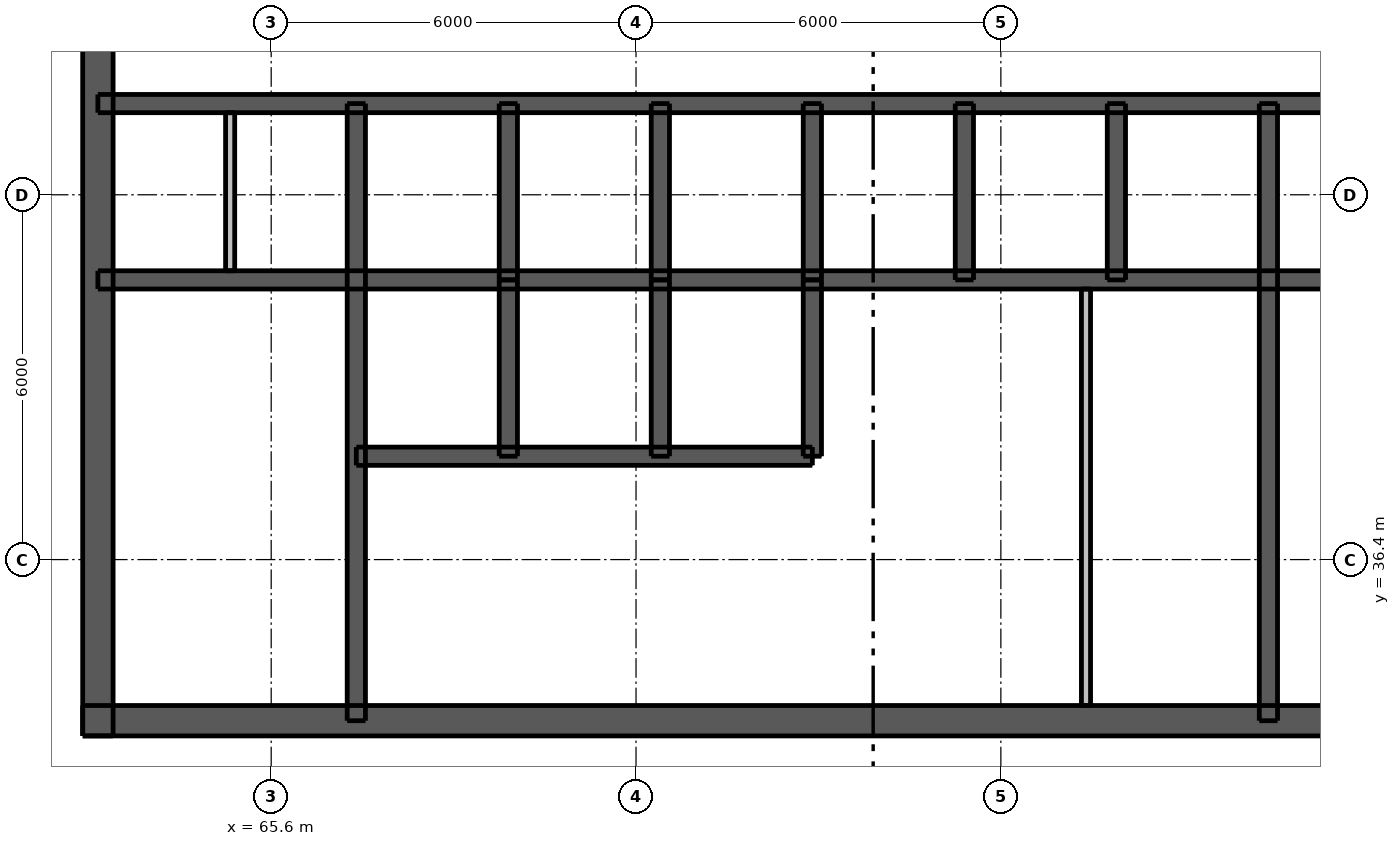
"""IFC4 building model, lengths in metres.
Left out: names, types, materials, properties, quantities, classifications, styles, units other than length and angle.
Written with IfcOpenShell. Run it as: python <this file> out.ifc"""

import sys

from ifc_helpers import new_model, si_unit, direction, frame, frame_2d, origin, place, context, subcontext, project, spatial, rectangle, extrude, element, fill, save


model = new_model("IFC4")
c1 = context("Model", 3, precision=1e-05, world=origin(), true_north=direction((0.0, 1.0)))
c2 = subcontext(c1, "Body", "Model", "MODEL_VIEW")
j1 = project(units=[si_unit("LENGTHUNIT", "METRE"), si_unit("PLANEANGLEUNIT", "RADIAN")], contexts=[c1])
p1 = place(None, origin())
s1 = spatial("IfcSite", under=j1, at=p1, CompositionType="ELEMENT")
p2 = place(p1, origin())
s2 = spatial("IfcBuilding", under=s1, at=p2, CompositionType="ELEMENT")
p3 = place(p2, frame((0.0, 0.0, 248.8)))
s3 = spatial("IfcBuildingStorey", under=s2, at=p3, CompositionType="ELEMENT", Elevation=248.8)
p4 = place(p3, frame((62.5, 33.75, 0.0), z_axis=(0.0, 0.0, 1.0), x_axis=(1.0, 0.0, 0.0)))
e1 = element("IfcWall", 1, at=p4, inside=s3, PredefinedType="SHEAR", context=c2, shape_type="SweptSolid", body=[
    extrude(rectangle(XDim=24.0, YDim=0.5, at=frame_2d((12.0, 0.0))), origin(), (0.0, 0.0, 1.0), 3.05),
])
p5 = place(p4, frame((1.875, 0.0, 0.0)))
e2 = element("IfcOpeningElement", 2, at=p5, cuts=e1, PredefinedType="OPENING", context=c2, shape_type="SweptSolid", body=[
    extrude(rectangle(XDim=1.1, YDim=2.1, at=frame_2d((0.55, 1.05))), frame((0.0, 0.26, 0.0), z_axis=(0.0, -1.0, 0.0), x_axis=(1.0, 0.0, 0.0)), (0.0, 0.0, 1.0), 0.52),
])
p6 = place(p4, frame((21.025, 0.0, 0.0)))
e3 = element("IfcOpeningElement", 3, at=p6, cuts=e1, PredefinedType="OPENING", context=c2, shape_type="SweptSolid", body=[
    extrude(rectangle(XDim=1.1, YDim=2.1, at=frame_2d((0.55, 1.05))), frame((0.0, 0.26, 0.0), z_axis=(0.0, -1.0, 0.0), x_axis=(1.0, 0.0, 0.0)), (0.0, 0.0, 1.0), 0.52),
])
p7 = place(p4, frame((8.0, 0.0, 0.0)))
e4 = element("IfcOpeningElement", 4, at=p7, cuts=e1, PredefinedType="OPENING", context=c2, shape_type="SweptSolid", body=[
    extrude(rectangle(XDim=1.1, YDim=2.1, at=frame_2d((0.55, 1.05))), frame((0.0, 0.26, 0.0), z_axis=(0.0, -1.0, 0.0), x_axis=(1.0, 0.0, 0.0)), (0.0, 0.0, 1.0), 0.52),
])
p8 = place(p4, frame((17.512, 0.0, 0.0)))
e5 = element("IfcOpeningElement", 5, at=p8, cuts=e1, PredefinedType="OPENING", context=c2, shape_type="SweptSolid", body=[
    extrude(rectangle(XDim=0.9, YDim=2.1, at=frame_2d((0.45, 1.05))), frame((0.0, 0.26, 0.0), z_axis=(0.0, -1.0, 0.0), x_axis=(1.0, 0.0, 0.0)), (0.0, 0.0, 1.0), 0.52),
])
p9 = place(p3, frame((62.75, 33.5, 0.0), z_axis=(0.0, 0.0, 1.0), x_axis=(0.0, 1.0, 0.0)))
e6 = element("IfcWall", 6, at=p9, inside=s3, PredefinedType="SHEAR", context=c2, shape_type="SweptSolid", body=[
    extrude(rectangle(XDim=24.0, YDim=0.5, at=frame_2d((12.0, 0.0))), origin(), (0.0, 0.0, 1.0), 3.05),
])
p10 = place(p9, frame((11.2, 0.0, 0.0)))
e7 = element("IfcOpeningElement", 7, at=p10, cuts=e6, PredefinedType="OPENING", context=c2, shape_type="SweptSolid", body=[
    extrude(rectangle(XDim=1.6, YDim=2.1, at=frame_2d((0.8, 1.05))), frame((0.0, 0.26, 0.0), z_axis=(0.0, -1.0, 0.0), x_axis=(1.0, 0.0, 0.0)), (0.0, 0.0, 1.0), 0.52),
])
p11 = place(p3, frame((62.75, 41.0, 0.0), z_axis=(0.0, 0.0, 1.0), x_axis=(1.0, 0.0, 0.0)))
e8 = element("IfcWall", 8, at=p11, inside=s3, PredefinedType="SHEAR", context=c2, shape_type="SweptSolid", body=[
    extrude(rectangle(XDim=23.5, YDim=0.3, at=frame_2d((11.75, 0.0))), origin(), (0.0, 0.0, 1.0), 3.05),
])
p12 = place(p3, frame((62.75, 43.9, 0.0), z_axis=(0.0, 0.0, 1.0), x_axis=(1.0, 0.0, 0.0)))
e9 = element("IfcWall", 9, at=p12, inside=s3, PredefinedType="SHEAR", context=c2, shape_type="SweptSolid", body=[
    extrude(rectangle(XDim=23.5, YDim=0.3, at=frame_2d((11.75, 0.0))), origin(), (0.0, 0.0, 1.0), 3.05),
])
p13 = place(p12, frame((0.762, 0.0, 0.0)))
e10 = element("IfcOpeningElement", 10, at=p13, cuts=e9, PredefinedType="OPENING", context=c2, shape_type="SweptSolid", body=[
    extrude(rectangle(XDim=0.9, YDim=2.1, at=frame_2d((0.45, 1.05))), frame((0.0, 0.16, 0.0), z_axis=(0.0, -1.0, 0.0), x_axis=(1.0, 0.0, 0.0)), (0.0, 0.0, 1.0), 0.32),
])
p14 = place(p12, frame((2.688, 0.0, 0.0)))
e11 = element("IfcOpeningElement", 11, at=p14, cuts=e9, PredefinedType="OPENING", context=c2, shape_type="SweptSolid", body=[
    extrude(rectangle(XDim=0.9, YDim=2.1, at=frame_2d((0.45, 1.05))), frame((0.0, 0.16, 0.0), z_axis=(0.0, -1.0, 0.0), x_axis=(1.0, 0.0, 0.0)), (0.0, 0.0, 1.0), 0.32),
])
p15 = place(p12, frame((20.875, 0.0, 0.0)))
e12 = element("IfcOpeningElement", 12, at=p15, cuts=e9, PredefinedType="OPENING", context=c2, shape_type="SweptSolid", body=[
    extrude(rectangle(XDim=0.9, YDim=2.1, at=frame_2d((0.45, 1.05))), frame((0.0, 0.16, 0.0), z_axis=(0.0, -1.0, 0.0), x_axis=(1.0, 0.0, 0.0)), (0.0, 0.0, 1.0), 0.32),
])
p16 = place(p12, frame((5.05, 0.0, 0.0)))
e13 = element("IfcOpeningElement", 13, at=p16, cuts=e9, PredefinedType="OPENING", context=c2, shape_type="SweptSolid", body=[
    extrude(rectangle(XDim=0.9, YDim=2.1, at=frame_2d((0.45, 1.05))), frame((0.0, 0.16, 0.0), z_axis=(0.0, -1.0, 0.0), x_axis=(1.0, 0.0, 0.0)), (0.0, 0.0, 1.0), 0.32),
])
p17 = place(p12, frame((7.55, 0.0, 0.0)))
e14 = element("IfcOpeningElement", 14, at=p17, cuts=e9, PredefinedType="OPENING", context=c2, shape_type="SweptSolid", body=[
    extrude(rectangle(XDim=0.9, YDim=2.1, at=frame_2d((0.45, 1.05))), frame((0.0, 0.16, 0.0), z_axis=(0.0, -1.0, 0.0), x_axis=(1.0, 0.0, 0.0)), (0.0, 0.0, 1.0), 0.32),
])
p18 = place(p12, frame((12.55, 0.0, 0.0)))
e15 = element("IfcOpeningElement", 15, at=p18, cuts=e9, PredefinedType="OPENING", context=c2, shape_type="SweptSolid", body=[
    extrude(rectangle(XDim=0.9, YDim=2.1, at=frame_2d((0.45, 1.05))), frame((0.0, 0.16, 0.0), z_axis=(0.0, -1.0, 0.0), x_axis=(1.0, 0.0, 0.0)), (0.0, 0.0, 1.0), 0.32),
])
p19 = place(p12, frame((15.05, 0.0, 0.0)))
e16 = element("IfcOpeningElement", 16, at=p19, cuts=e9, PredefinedType="OPENING", context=c2, shape_type="SweptSolid", body=[
    extrude(rectangle(XDim=0.9, YDim=2.1, at=frame_2d((0.45, 1.05))), frame((0.0, 0.16, 0.0), z_axis=(0.0, -1.0, 0.0), x_axis=(1.0, 0.0, 0.0)), (0.0, 0.0, 1.0), 0.32),
])
p20 = place(p3, frame((67.0, 33.75, 0.0), z_axis=(0.0, 0.0, 1.0), x_axis=(0.0, 1.0, 0.0)))
e17 = element("IfcWall", 17, at=p20, inside=s3, PredefinedType="SHEAR", context=c2, shape_type="SweptSolid", body=[
    extrude(rectangle(XDim=10.15, YDim=0.3, at=frame_2d((5.075, 0.0))), origin(), (0.0, 0.0, 1.0), 3.05),
])
p21 = place(p20, frame((0.45, 0.0, 0.0)))
e18 = element("IfcOpeningElement", 18, at=p21, cuts=e17, PredefinedType="OPENING", context=c2, shape_type="SweptSolid", body=[
    extrude(rectangle(XDim=1.1, YDim=2.1, at=frame_2d((0.55, 1.05))), frame((0.0, 0.16, 0.0), z_axis=(0.0, -1.0, 0.0), x_axis=(1.0, 0.0, 0.0)), (0.0, 0.0, 1.0), 0.32),
])
p22 = place(p3, frame((82.0, 33.75, 0.0), z_axis=(0.0, 0.0, 1.0), x_axis=(0.0, 1.0, 0.0)))
e19 = element("IfcWall", 19, at=p22, inside=s3, PredefinedType="SHEAR", context=c2, shape_type="SweptSolid", body=[
    extrude(rectangle(XDim=10.15, YDim=0.3, at=frame_2d((5.075, 0.0))), origin(), (0.0, 0.0, 1.0), 3.05),
])
for number, where, z_axis, x_axis in (
    (20, (69.5, 41.0, 0.0), (0.0, 0.0, 1.0), (0.0, 1.0, 0.0)),
    (21, (72.0, 41.0, 0.0), (0.0, 0.0, 1.0), (0.0, 1.0, 0.0)),
    (22, (74.5, 41.0, 0.0), (0.0, 0.0, 1.0), (0.0, 1.0, 0.0)),
    (23, (77.0, 41.0, 0.0), (0.0, 0.0, 1.0), (0.0, 1.0, 0.0)),
    (24, (79.5, 41.0, 0.0), (0.0, 0.0, 1.0), (0.0, 1.0, 0.0)),
):
    element("IfcWall", number, at=place(p3, frame(where, z_axis=z_axis, x_axis=x_axis)), inside=s3, PredefinedType="SHEAR", context=c2, shape_type="SweptSolid", body=[
        extrude(rectangle(XDim=2.9, YDim=0.3, at=frame_2d((1.45, 0.0))), origin(), (0.0, 0.0, 1.0), 3.05),
    ])
p23 = place(p3, frame((67.0, 38.1, 0.0), z_axis=(0.0, 0.0, 1.0), x_axis=(1.0, 0.0, 0.0)))
e25 = element("IfcWall", 25, at=p23, inside=s3, PredefinedType="SHEAR", context=c2, shape_type="SweptSolid", body=[
    extrude(rectangle(XDim=7.5, YDim=0.3, at=frame_2d((3.75, 0.0))), origin(), (0.0, 0.0, 1.0), 3.05),
])
p24 = place(p23, frame((0.7, 0.0, 0.0)))
e26 = element("IfcOpeningElement", 26, at=p24, cuts=e25, PredefinedType="OPENING", context=c2, shape_type="SweptSolid", body=[
    extrude(rectangle(XDim=1.1, YDim=2.1, at=frame_2d((0.55, 1.05))), frame((0.0, 0.16, 0.0), z_axis=(0.0, -1.0, 0.0), x_axis=(1.0, 0.0, 0.0)), (0.0, 0.0, 1.0), 0.32),
])
p25 = place(p23, frame((3.2, 0.0, 0.0)))
e27 = element("IfcOpeningElement", 27, at=p25, cuts=e25, PredefinedType="OPENING", context=c2, shape_type="SweptSolid", body=[
    extrude(rectangle(XDim=1.1, YDim=2.1, at=frame_2d((0.55, 1.05))), frame((0.0, 0.16, 0.0), z_axis=(0.0, -1.0, 0.0), x_axis=(1.0, 0.0, 0.0)), (0.0, 0.0, 1.0), 0.32),
])
p26 = place(p23, frame((5.65, 0.0, 0.0)))
e28 = element("IfcOpeningElement", 28, at=p26, cuts=e25, PredefinedType="OPENING", context=c2, shape_type="SweptSolid", body=[
    extrude(rectangle(XDim=1.2, YDim=2.1, at=frame_2d((0.6, 1.05))), frame((0.0, 0.16, 0.0), z_axis=(0.0, -1.0, 0.0), x_axis=(1.0, 0.0, 0.0)), (0.0, 0.0, 1.0), 0.32),
])
for number, where, z_axis, x_axis in (
    (29, (69.5, 38.1, 0.0), (0.0, 0.0, 1.0), (0.0, 1.0, 0.0)),
    (30, (72.0, 38.1, 0.0), (0.0, 0.0, 1.0), (0.0, 1.0, 0.0)),
    (31, (74.5, 38.1, 0.0), (0.0, 0.0, 1.0), (0.0, 1.0, 0.0)),
):
    element("IfcWall", number, at=place(p3, frame(where, z_axis=z_axis, x_axis=x_axis)), inside=s3, PredefinedType="SHEAR", context=c2, shape_type="SweptSolid", body=[
        extrude(rectangle(XDim=2.9, YDim=0.3, at=frame_2d((1.45, 0.0))), origin(), (0.0, 0.0, 1.0), 3.05),
    ])
p27 = place(p3, frame((79.0, 34.0, 0.0), z_axis=(0.0, 0.0, 1.0), x_axis=(0.0, 1.0, 0.0)))
e32 = element("IfcWall", 32, at=p27, inside=s3, PredefinedType="PLUMBINGWALL", context=c2, shape_type="SweptSolid", body=[
    extrude(rectangle(XDim=6.85, YDim=0.15, at=frame_2d((3.425, 0.0))), origin(), (0.0, 0.0, 1.0), 3.05),
])
p28 = place(p3, frame((64.925, 41.15, 0.0), z_axis=(0.0, 0.0, 1.0), x_axis=(0.0, 1.0, 0.0)))
e33 = element("IfcWall", 33, at=p28, inside=s3, PredefinedType="PLUMBINGWALL", context=c2, shape_type="SweptSolid", body=[
    extrude(rectangle(XDim=2.6, YDim=0.15, at=frame_2d((1.3, 0.0))), origin(), (0.0, 0.0, 1.0), 3.05),
])
p29 = place(p5, origin())
e34 = element("IfcDoor", 34, at=p29, inside=s3, OperationType="SINGLE_SWING_LEFT", PredefinedType="DOOR", context=c2, shape_type="SweptSolid", body=[
    extrude(rectangle(XDim=1.1, YDim=2.1, at=frame_2d((0.55, 1.05))), frame((0.0, 0.237, 0.0), z_axis=(0.0, -1.0, 0.0), x_axis=(1.0, 0.0, 0.0)), (0.0, 0.0, 1.0), 0.05),
])
fill(e2, e34)
p30 = place(p10, origin())
e35 = element("IfcDoor", 35, at=p30, inside=s3, OperationType="DOUBLE_DOOR_SINGLE_SWING", PredefinedType="DOOR", context=c2, shape_type="SweptSolid", body=[
    extrude(rectangle(XDim=1.6, YDim=2.1, at=frame_2d((0.8, 1.05))), frame((0.0, -0.188, 0.0), z_axis=(0.0, -1.0, 0.0), x_axis=(1.0, 0.0, 0.0)), (0.0, 0.0, 1.0), 0.05),
])
fill(e7, e35)
p31 = place(p7, origin())
e36 = element("IfcDoor", 36, at=p31, inside=s3, OperationType="SINGLE_SWING_LEFT", PredefinedType="DOOR", context=c2, shape_type="SweptSolid", body=[
    extrude(rectangle(XDim=1.1, YDim=2.1, at=frame_2d((0.55, 1.05))), frame((0.0, 0.237, 0.0), z_axis=(0.0, -1.0, 0.0), x_axis=(1.0, 0.0, 0.0)), (0.0, 0.0, 1.0), 0.05),
])
fill(e4, e36)
p32 = place(p21, origin())
e37 = element("IfcDoor", 37, at=p32, inside=s3, OperationType="SINGLE_SWING_RIGHT", PredefinedType="DOOR", context=c2, shape_type="SweptSolid", body=[
    extrude(rectangle(XDim=1.1, YDim=2.1, at=frame_2d((0.55, 1.05))), frame((0.0, -0.087, 0.0), z_axis=(0.0, -1.0, 0.0), x_axis=(1.0, 0.0, 0.0)), (0.0, 0.0, 1.0), 0.05),
])
fill(e18, e37)
p33 = place(p8, origin())
e38 = element("IfcDoor", 38, at=p33, inside=s3, OperationType="SINGLE_SWING_LEFT", PredefinedType="DOOR", context=c2, shape_type="SweptSolid", body=[
    extrude(rectangle(XDim=0.9, YDim=2.1, at=frame_2d((0.45, 1.05))), frame((0.0, 0.237, 0.0), z_axis=(0.0, -1.0, 0.0), x_axis=(1.0, 0.0, 0.0)), (0.0, 0.0, 1.0), 0.05),
])
fill(e5, e38)
p34 = place(p13, origin())
e39 = element("IfcDoor", 39, at=p34, inside=s3, OperationType="SINGLE_SWING_LEFT", PredefinedType="DOOR", context=c2, shape_type="SweptSolid", body=[
    extrude(rectangle(XDim=0.9, YDim=2.1, at=frame_2d((0.45, 1.05))), frame((0.0, -0.087, 0.0), z_axis=(0.0, -1.0, 0.0), x_axis=(1.0, 0.0, 0.0)), (0.0, 0.0, 1.0), 0.05),
])
fill(e10, e39)
p35 = place(p14, origin())
e40 = element("IfcDoor", 40, at=p35, inside=s3, OperationType="SINGLE_SWING_RIGHT", PredefinedType="DOOR", context=c2, shape_type="SweptSolid", body=[
    extrude(rectangle(XDim=0.9, YDim=2.1, at=frame_2d((0.45, 1.05))), frame((0.0, -0.087, 0.0), z_axis=(0.0, -1.0, 0.0), x_axis=(1.0, 0.0, 0.0)), (0.0, 0.0, 1.0), 0.05),
])
fill(e11, e40)
p36 = place(p16, origin())
e41 = element("IfcDoor", 41, at=p36, inside=s3, OperationType="SINGLE_SWING_RIGHT", PredefinedType="DOOR", context=c2, shape_type="SweptSolid", body=[
    extrude(rectangle(XDim=0.9, YDim=2.1, at=frame_2d((0.45, 1.05))), frame((0.0, -0.087, 0.0), z_axis=(0.0, -1.0, 0.0), x_axis=(1.0, 0.0, 0.0)), (0.0, 0.0, 1.0), 0.05),
])
fill(e13, e41)
p37 = place(p17, origin())
e42 = element("IfcDoor", 42, at=p37, inside=s3, OperationType="SINGLE_SWING_LEFT", PredefinedType="DOOR", context=c2, shape_type="SweptSolid", body=[
    extrude(rectangle(XDim=0.9, YDim=2.1, at=frame_2d((0.45, 1.05))), frame((0.0, -0.087, 0.0), z_axis=(0.0, -1.0, 0.0), x_axis=(1.0, 0.0, 0.0)), (0.0, 0.0, 1.0), 0.05),
])
fill(e14, e42)
p38 = place(p18, origin())
e43 = element("IfcDoor", 43, at=p38, inside=s3, OperationType="SINGLE_SWING_LEFT", PredefinedType="DOOR", context=c2, shape_type="SweptSolid", body=[
    extrude(rectangle(XDim=0.9, YDim=2.1, at=frame_2d((0.45, 1.05))), frame((0.0, -0.087, 0.0), z_axis=(0.0, -1.0, 0.0), x_axis=(1.0, 0.0, 0.0)), (0.0, 0.0, 1.0), 0.05),
])
fill(e15, e43)
p39 = place(p19, origin())
e44 = element("IfcDoor", 44, at=p39, inside=s3, OperationType="SINGLE_SWING_RIGHT", PredefinedType="DOOR", context=c2, shape_type="SweptSolid", body=[
    extrude(rectangle(XDim=0.9, YDim=2.1, at=frame_2d((0.45, 1.05))), frame((0.0, -0.087, 0.0), z_axis=(0.0, -1.0, 0.0), x_axis=(1.0, 0.0, 0.0)), (0.0, 0.0, 1.0), 0.05),
])
fill(e16, e44)
p40 = place(p24, origin())
e45 = element("IfcDoor", 45, at=p40, inside=s3, OperationType="DOUBLE_DOOR_SLIDING", PredefinedType="DOOR", context=c2, shape_type="SweptSolid", body=[
    extrude(rectangle(XDim=1.1, YDim=2.1, at=frame_2d((0.55, 1.05))), frame((0.0, 0.025, 0.0), z_axis=(0.0, -1.0, 0.0), x_axis=(1.0, 0.0, 0.0)), (0.0, 0.0, 1.0), 0.05),
])
fill(e26, e45)
p41 = place(p25, origin())
e46 = element("IfcDoor", 46, at=p41, inside=s3, OperationType="DOUBLE_DOOR_SLIDING", PredefinedType="DOOR", context=c2, shape_type="SweptSolid", body=[
    extrude(rectangle(XDim=1.1, YDim=2.1, at=frame_2d((0.55, 1.05))), frame((0.0, 0.025, 0.0), z_axis=(0.0, -1.0, 0.0), x_axis=(1.0, 0.0, 0.0)), (0.0, 0.0, 1.0), 0.05),
])
fill(e27, e46)
p42 = place(p26, origin())
e47 = element("IfcDoor", 47, at=p42, inside=s3, OperationType="DOUBLE_DOOR_SLIDING", PredefinedType="DOOR", context=c2, shape_type="SweptSolid", body=[
    extrude(rectangle(XDim=1.2, YDim=2.1, at=frame_2d((0.6, 1.05))), frame((0.0, 0.025, 0.0), z_axis=(0.0, -1.0, 0.0), x_axis=(1.0, 0.0, 0.0)), (0.0, 0.0, 1.0), 0.05),
])
fill(e28, e47)
save(model, sys.argv[1])
